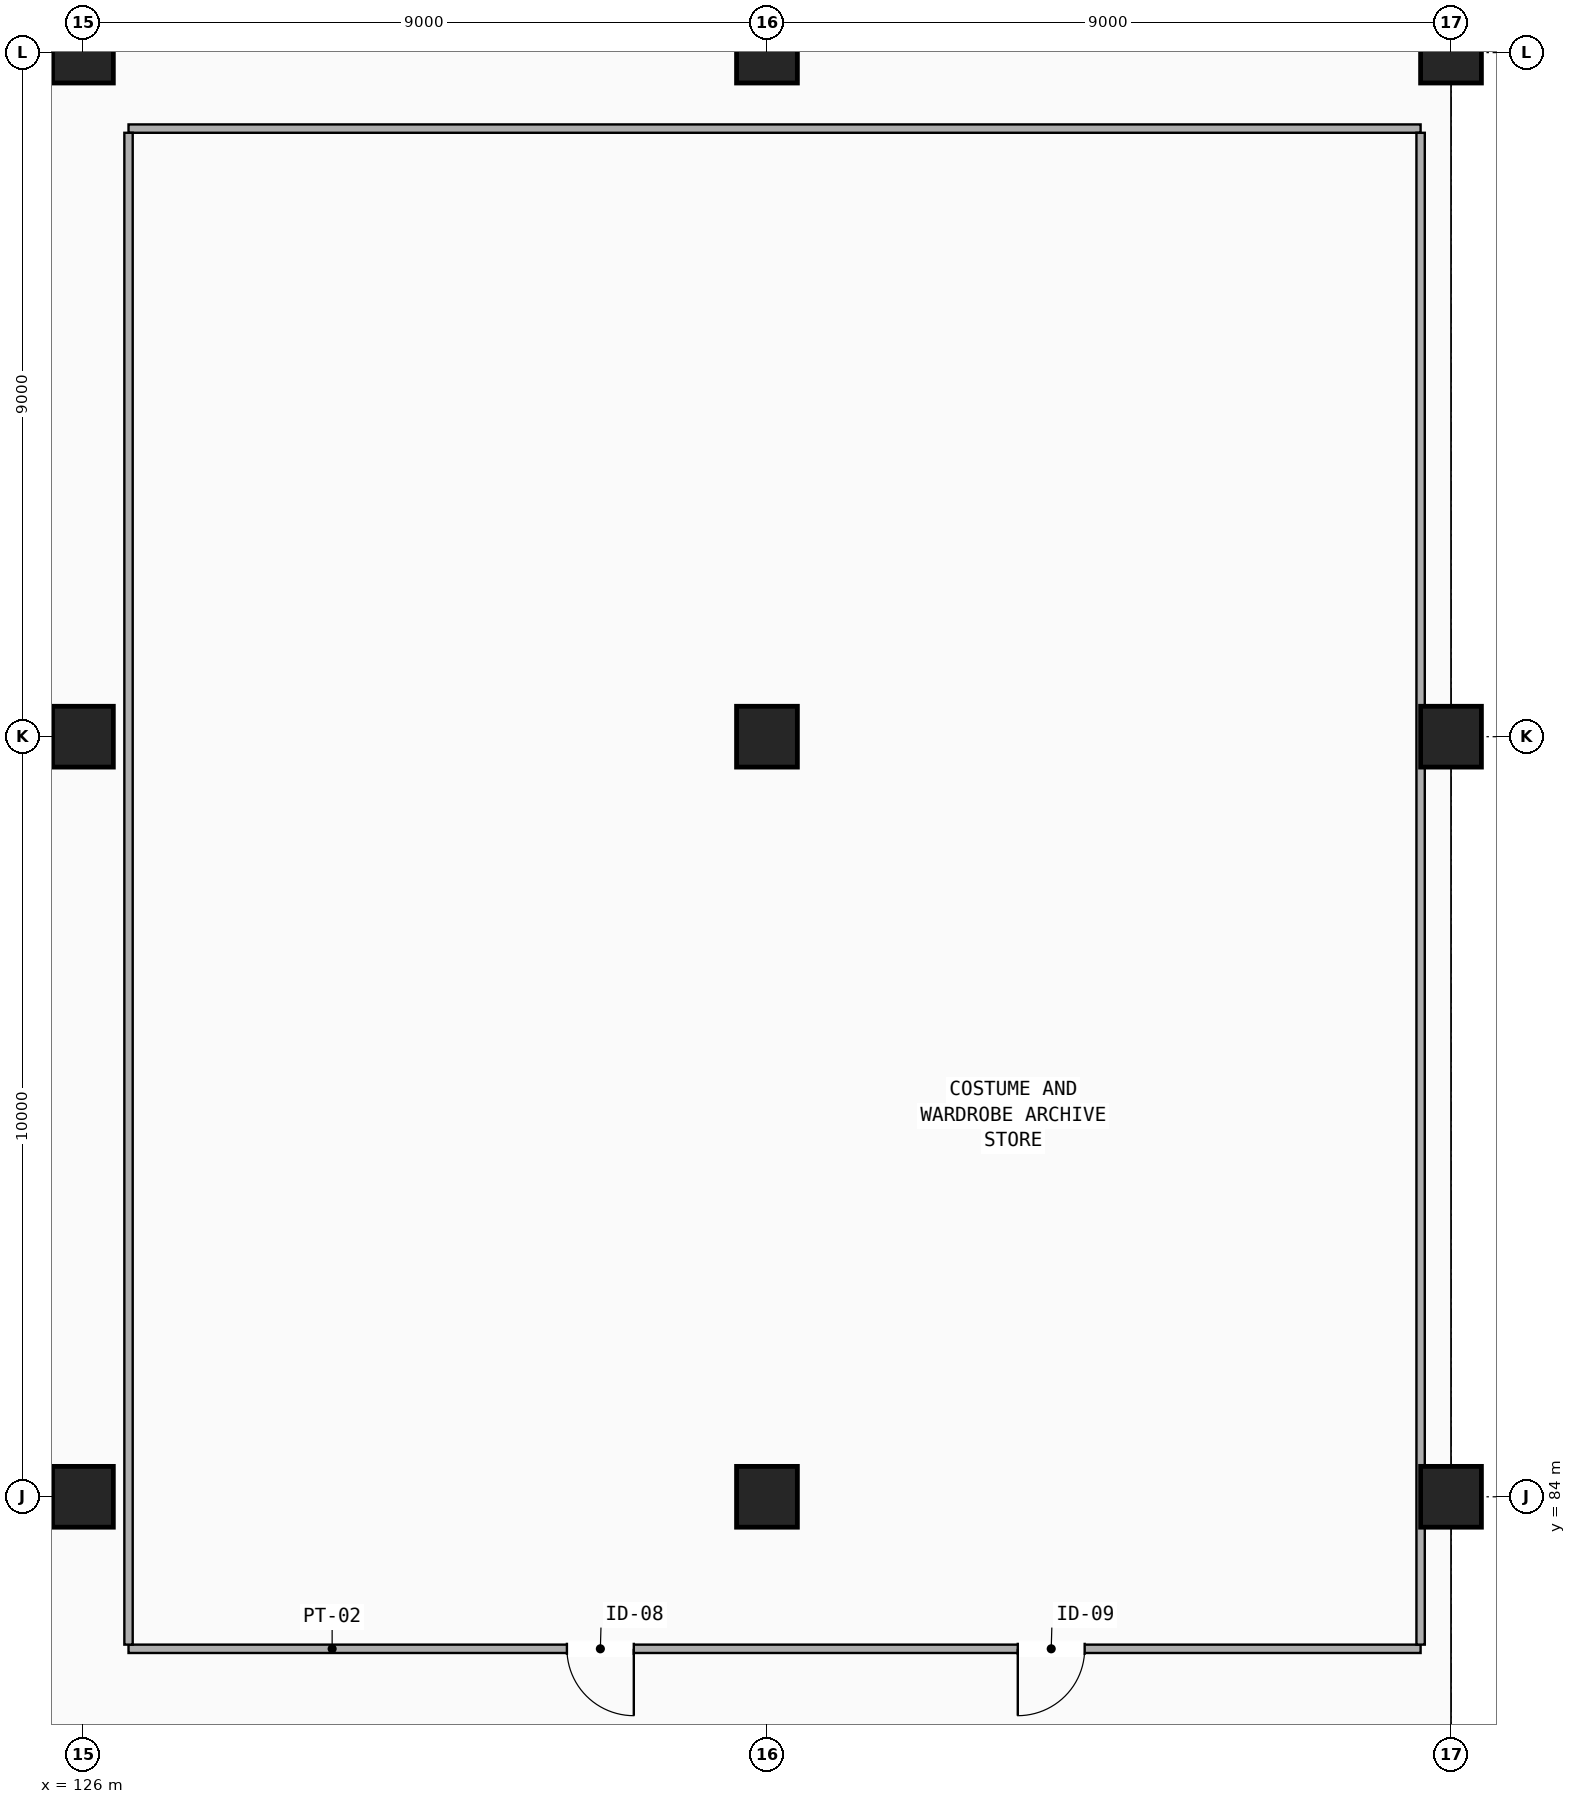
"""IFC4 building model, lengths in metres.
Left out: names, types, materials, properties, quantities, classifications, styles, units other than length and angle.
Written with IfcOpenShell. Run it as: python <this file> out.ifc"""

import sys

from ifc_helpers import new_model, si_unit, direction, frame, frame_2d, origin, origin_2d, place, context, subcontext, project, spatial, rectangle, extrude, element, fill, save


model = new_model("IFC4")
c1 = context("Model", 3, precision=1e-05, world=origin(), true_north=direction((0.0, 1.0)))
c2 = subcontext(c1, "Body", "Model", "MODEL_VIEW")
j1 = project(units=[si_unit("LENGTHUNIT", "METRE"), si_unit("PLANEANGLEUNIT", "RADIAN")], contexts=[c1])
p1 = place(None, origin())
s1 = spatial("IfcSite", under=j1, at=p1, CompositionType="ELEMENT")
p2 = place(p1, origin())
s2 = spatial("IfcBuilding", under=s1, at=p2, CompositionType="ELEMENT")
p3 = place(p2, frame((0.0, 0.0, -5.1)))
s3 = spatial("IfcBuildingStorey", under=s2, at=p3, CompositionType="ELEMENT", Elevation=-5.1)
for number, where, z_axis, x_axis in (
    (1, (126.0, 84.0, 0.0), (0.0, 0.0, 1.0), (1.0, 0.0, 0.0)),
    (2, (126.0, 94.0, 0.0), (0.0, 0.0, 1.0), (1.0, 0.0, 0.0)),
    (3, (126.0, 103.0, 0.0), (0.0, 0.0, 1.0), (1.0, 0.0, 0.0)),
    (4, (135.0, 84.0, 0.0), (0.0, 0.0, 1.0), (1.0, 0.0, 0.0)),
    (5, (135.0, 94.0, 0.0), (0.0, 0.0, 1.0), (1.0, 0.0, 0.0)),
    (6, (135.0, 103.0, 0.0), (0.0, 0.0, 1.0), (1.0, 0.0, 0.0)),
    (7, (144.0, 84.0, 0.0), (0.0, 0.0, 1.0), (1.0, 0.0, 0.0)),
    (8, (144.0, 94.0, 0.0), (0.0, 0.0, 1.0), (1.0, 0.0, 0.0)),
    (9, (144.0, 103.0, 0.0), (0.0, 0.0, 1.0), (1.0, 0.0, 0.0)),
):
    element("IfcColumn", number, at=place(p3, frame(where, z_axis=z_axis, x_axis=x_axis)), inside=s3, PredefinedType="COLUMN", context=c2, shape_type="SweptSolid", body=[
        extrude(rectangle(XDim=0.8, YDim=0.8, at=origin_2d()), origin(), (0.0, 0.0, 1.0), 5.1),
    ])
p4 = place(p3, frame((126.6, 82.0, 0.0), z_axis=(0.0, 0.0, 1.0), x_axis=(1.0, 0.0, 0.0)))
e10 = element("IfcWall", 10, at=p4, inside=s3, PredefinedType="PARTITIONING", context=c2, shape_type="SweptSolid", body=[
    extrude(rectangle(XDim=17.0, YDim=0.11, at=frame_2d((8.5, 0.0))), origin(), (0.0, 0.0, 1.0), 4.12),
])
p5 = place(p4, frame((5.768, 0.0, 0.0)))
e11 = element("IfcOpeningElement", 11, at=p5, cuts=e10, PredefinedType="OPENING", context=c2, shape_type="SweptSolid", body=[
    extrude(rectangle(XDim=0.88, YDim=2.14, at=frame_2d((0.44, 1.07))), frame((0.0, 0.065, 0.0), z_axis=(0.0, -1.0, 0.0), x_axis=(1.0, 0.0, 0.0)), (0.0, 0.0, 1.0), 0.13),
])
p6 = place(p4, frame((11.7, 0.0, 0.0)))
e12 = element("IfcOpeningElement", 12, at=p6, cuts=e10, PredefinedType="OPENING", context=c2, shape_type="SweptSolid", body=[
    extrude(rectangle(XDim=0.88, YDim=2.22, at=frame_2d((0.44, 1.11))), frame((0.0, 0.065, 0.0), z_axis=(0.0, -1.0, 0.0), x_axis=(1.0, 0.0, 0.0)), (0.0, 0.0, 1.0), 0.13),
])
p7 = place(p3, frame((126.6, 102.0, 0.0), z_axis=(0.0, 0.0, 1.0), x_axis=(1.0, 0.0, 0.0)))
e13 = element("IfcWall", 13, at=p7, inside=s3, PredefinedType="PARTITIONING", context=c2, shape_type="SweptSolid", body=[
    extrude(rectangle(XDim=17.0, YDim=0.11, at=frame_2d((8.5, 0.0))), origin(), (0.0, 0.0, 1.0), 3.96),
])
p8 = place(p3, frame((126.6, 82.055, 0.0), z_axis=(0.0, 0.0, 1.0), x_axis=(0.0, 1.0, 0.0)))
e14 = element("IfcWall", 14, at=p8, inside=s3, PredefinedType="PARTITIONING", context=c2, shape_type="SweptSolid", body=[
    extrude(rectangle(XDim=19.89, YDim=0.11, at=frame_2d((9.945, 0.0))), origin(), (0.0, 0.0, 1.0), 3.91),
])
p9 = place(p3, frame((143.6, 82.055, 0.0), z_axis=(0.0, 0.0, 1.0), x_axis=(0.0, 1.0, 0.0)))
e15 = element("IfcWall", 15, at=p9, inside=s3, PredefinedType="PARTITIONING", context=c2, shape_type="SweptSolid", body=[
    extrude(rectangle(XDim=19.89, YDim=0.11, at=frame_2d((9.945, 0.0))), origin(), (0.0, 0.0, 1.0), 3.9),
])
p10 = place(p5, frame((0.88, 0.0, 0.0), z_axis=(0.0, 0.0, 1.0), x_axis=(-1.0, 0.0, 0.0)))
e16 = element("IfcDoor", 16, at=p10, inside=s3, OperationType="SINGLE_SWING_LEFT", PredefinedType="DOOR", context=c2, shape_type="SweptSolid", body=[
    extrude(rectangle(XDim=0.88, YDim=2.14, at=frame_2d((0.44, 1.07))), frame((0.0, 0.025, 0.0), z_axis=(0.0, -1.0, 0.0), x_axis=(1.0, 0.0, 0.0)), (0.0, 0.0, 1.0), 0.05),
])
fill(e11, e16)
p11 = place(p6, frame((0.88, 0.0, 0.0), z_axis=(0.0, 0.0, 1.0), x_axis=(-1.0, 0.0, 0.0)))
e17 = element("IfcDoor", 17, at=p11, inside=s3, OperationType="SINGLE_SWING_RIGHT", PredefinedType="DOOR", context=c2, shape_type="SweptSolid", body=[
    extrude(rectangle(XDim=0.88, YDim=2.22, at=frame_2d((0.44, 1.11))), frame((0.0, 0.025, 0.0), z_axis=(0.0, -1.0, 0.0), x_axis=(1.0, 0.0, 0.0)), (0.0, 0.0, 1.0), 0.05),
])
fill(e12, e17)
save(model, sys.argv[1])
